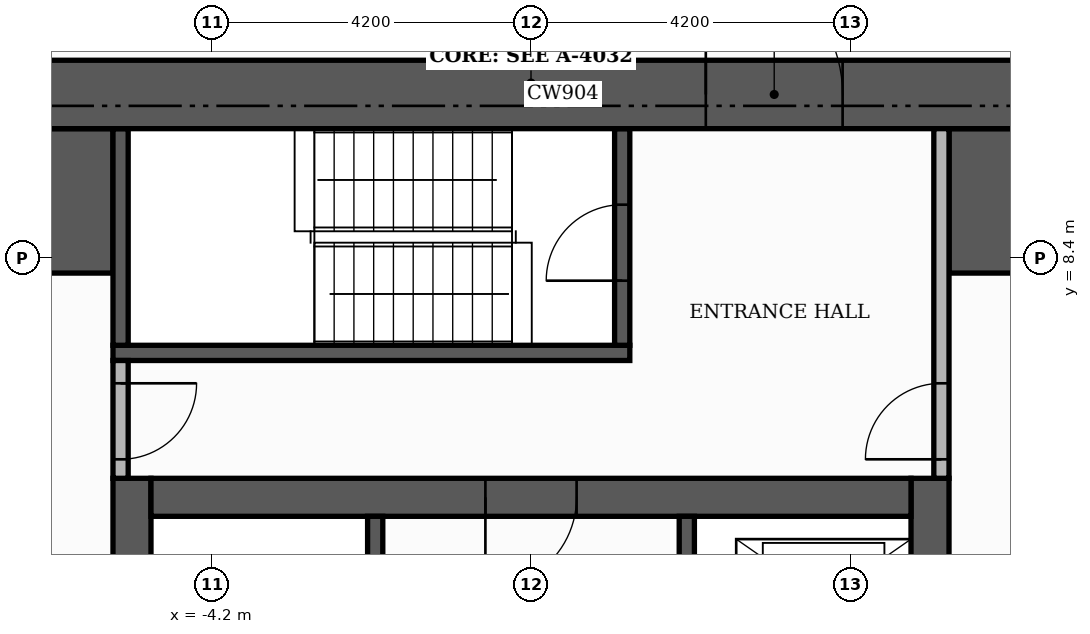
"""IFC4 building model, lengths in metres.
Left out: names, types, materials, properties, quantities, classifications, styles, units other than length and angle.
Written with IfcOpenShell. Run it as: python <this file> out.ifc"""

import sys

from ifc_helpers import new_model, si_unit, direction, frame, frame_2d, origin, place, context, subcontext, project, spatial, rectangle, extrude, element, fill, save


model = new_model("IFC4")
c1 = context("Model", 3, precision=1e-05, world=origin(), true_north=direction((0.0, 1.0)))
c2 = subcontext(c1, "Body", "Model", "MODEL_VIEW")
j1 = project(units=[si_unit("LENGTHUNIT", "METRE"), si_unit("PLANEANGLEUNIT", "RADIAN")], contexts=[c1])
p1 = place(None, origin())
s1 = spatial("IfcSite", under=j1, at=p1, CompositionType="ELEMENT")
p2 = place(p1, origin())
s2 = spatial("IfcBuilding", under=s1, at=p2, CompositionType="ELEMENT")
p3 = place(p2, frame((0.0, 0.0, 192.3)))
s3 = spatial("IfcBuildingStorey", under=s2, at=p3, CompositionType="ELEMENT", Elevation=192.3)
for number, where, z_axis, x_axis in (
    (1, (-5.25, -5.0, 0.0), (0.0, 0.0, 1.0), (0.0, 1.0, 0.0)),
    (2, (5.25, -5.0, 0.0), (0.0, 0.0, 1.0), (0.0, 1.0, 0.0)),
):
    element("IfcWall", number, at=place(p3, frame(where, z_axis=z_axis, x_axis=x_axis)), inside=s3, PredefinedType="SHEAR", context=c2, shape_type="SweptSolid", body=[
        extrude(rectangle(XDim=10.5, YDim=0.5, at=frame_2d((5.25, 0.0))), origin(), (0.0, 0.0, 1.0), 3.48),
    ])
p4 = place(p3, frame((-5.0, 5.25, 0.0), z_axis=(0.0, 0.0, 1.0), x_axis=(1.0, 0.0, 0.0)))
e3 = element("IfcWall", 3, at=p4, inside=s3, PredefinedType="SHEAR", context=c2, shape_type="SweptSolid", body=[
    extrude(rectangle(XDim=10.0, YDim=0.5, at=frame_2d((5.0, 0.0))), origin(), (0.0, 0.0, 1.0), 3.48),
])
p5 = place(p4, frame((4.4, 0.0, 0.0)))
e4 = element("IfcOpeningElement", 4, at=p5, cuts=e3, PredefinedType="OPENING", context=c2, shape_type="SweptSolid", body=[
    extrude(rectangle(XDim=1.2, YDim=2.1, at=frame_2d((0.6, 1.05))), frame((0.0, 0.26, 0.0), z_axis=(0.0, -1.0, 0.0), x_axis=(1.0, 0.0, 0.0)), (0.0, 0.0, 1.0), 0.52),
])
for number, where, z_axis, x_axis in (
    (5, (-10.1, 9.15, 0.0), (0.0, 0.0, 1.0), (1.0, 0.0, 0.0)),
    (6, (5.5, 9.15, 0.0), (0.0, 0.0, 1.0), (1.0, 0.0, 0.0)),
):
    element("IfcWall", number, at=place(p3, frame(where, z_axis=z_axis, x_axis=x_axis)), inside=s3, PredefinedType="SHEAR", context=c2, shape_type="SweptSolid", body=[
        extrude(rectangle(XDim=4.6, YDim=1.9, at=frame_2d((2.3, 0.0))), origin(), (0.0, 0.0, 1.0), 3.48),
    ])
p6 = place(p3, frame((-2.05, -1.4, 0.0), z_axis=(0.0, 0.0, 1.0), x_axis=(0.0, 1.0, 0.0)))
e7 = element("IfcWall", 7, at=p6, inside=s3, PredefinedType="SHEAR", context=c2, shape_type="SweptSolid", body=[
    extrude(rectangle(XDim=6.4, YDim=0.2, at=frame_2d((3.2, 0.0))), origin(), (0.0, 0.0, 1.0), 3.48),
])
p7 = place(p6, frame((0.15, 0.0, 0.0)))
e8 = element("IfcOpeningElement", 8, at=p7, cuts=e7, PredefinedType="OPENING", context=c2, shape_type="SweptSolid", body=[
    extrude(rectangle(XDim=1.0, YDim=2.1, at=frame_2d((0.5, 1.05))), frame((0.0, 0.11, 0.0), z_axis=(0.0, -1.0, 0.0), x_axis=(1.0, 0.0, 0.0)), (0.0, 0.0, 1.0), 0.22),
])
p8 = place(p3, frame((-5.5, 7.15, 0.0), z_axis=(0.0, 0.0, 1.0), x_axis=(1.0, 0.0, 0.0)))
e9 = element("IfcWall", 9, at=p8, inside=s3, PredefinedType="SHEAR", context=c2, shape_type="SweptSolid", body=[
    extrude(rectangle(XDim=6.8, YDim=0.2, at=frame_2d((3.4, 0.0))), origin(), (0.0, 0.0, 1.0), 3.48),
])
p9 = place(p3, frame((-5.4, 7.25, 0.0), z_axis=(0.0, 0.0, 1.0), x_axis=(0.0, 1.0, 0.0)))
e10 = element("IfcWall", 10, at=p9, inside=s3, PredefinedType="SHEAR", context=c2, shape_type="SweptSolid", body=[
    extrude(rectangle(XDim=2.85, YDim=0.2, at=frame_2d((1.425, 0.0))), origin(), (0.0, 0.0, 1.0), 3.48),
])
p10 = place(p3, frame((1.2, 7.25, 0.0), z_axis=(0.0, 0.0, 1.0), x_axis=(0.0, 1.0, 0.0)))
e11 = element("IfcWall", 11, at=p10, inside=s3, PredefinedType="SHEAR", context=c2, shape_type="SweptSolid", body=[
    extrude(rectangle(XDim=2.85, YDim=0.2, at=frame_2d((1.425, 0.0))), origin(), (0.0, 0.0, 1.0), 3.48),
])
p11 = place(p10, frame((0.85, 0.0, 0.0)))
e12 = element("IfcOpeningElement", 12, at=p11, cuts=e11, PredefinedType="OPENING", context=c2, shape_type="SweptSolid", body=[
    extrude(rectangle(XDim=1.0, YDim=2.1, at=frame_2d((0.5, 1.05))), frame((0.0, 0.11, 0.0), z_axis=(0.0, -1.0, 0.0), x_axis=(1.0, 0.0, 0.0)), (0.0, 0.0, 1.0), 0.22),
])
p12 = place(p3, frame((2.05, 1.6, 0.0), z_axis=(0.0, 0.0, 1.0), x_axis=(0.0, 1.0, 0.0)))
e13 = element("IfcWall", 13, at=p12, inside=s3, PredefinedType="SHEAR", context=c2, shape_type="SweptSolid", body=[
    extrude(rectangle(XDim=3.4, YDim=0.2, at=frame_2d((1.7, 0.0))), origin(), (0.0, 0.0, 1.0), 3.48),
])
p13 = place(p12, frame((1.75, 0.0, 0.0)))
e14 = element("IfcOpeningElement", 14, at=p13, cuts=e13, PredefinedType="OPENING", context=c2, shape_type="SweptSolid", body=[
    extrude(rectangle(XDim=1.1, YDim=2.1, at=frame_2d((0.55, 1.05))), frame((0.0, 0.11, 0.0), z_axis=(0.0, -1.0, 0.0), x_axis=(1.0, 0.0, 0.0)), (0.0, 0.0, 1.0), 0.22),
])
p14 = place(p12, frame((0.15, 0.0, 0.0)))
e15 = element("IfcOpeningElement", 15, at=p14, cuts=e13, PredefinedType="OPENING", context=c2, shape_type="SweptSolid", body=[
    extrude(rectangle(XDim=0.8, YDim=2.1, at=frame_2d((0.4, 1.05))), frame((0.0, 0.11, 0.0), z_axis=(0.0, -1.0, 0.0), x_axis=(1.0, 0.0, 0.0)), (0.0, 0.0, 1.0), 0.22),
])
p15 = place(p3, frame((-11.0, 10.55, 0.0), z_axis=(0.0, 0.0, 1.0), x_axis=(1.0, 0.0, 0.0)))
e16 = element("IfcWall", 16, at=p15, inside=s3, PredefinedType="SHEAR", context=c2, shape_type="SweptSolid", body=[
    extrude(rectangle(XDim=22.0, YDim=0.9, at=frame_2d((11.0, 0.0))), origin(), (0.0, 0.0, 1.0), 3.48),
])
p16 = place(p15, frame((13.3, 0.0, 0.0)))
e17 = element("IfcOpeningElement", 17, at=p16, cuts=e16, PredefinedType="OPENING", context=c2, shape_type="SweptSolid", body=[
    extrude(rectangle(XDim=1.8, YDim=2.2, at=frame_2d((0.9, 1.1))), frame((0.0, 0.46, 0.0), z_axis=(0.0, -1.0, 0.0), x_axis=(1.0, 0.0, 0.0)), (0.0, 0.0, 1.0), 0.92),
])
p17 = place(p3, frame((-5.4, 5.5, 0.0), z_axis=(0.0, 0.0, 1.0), x_axis=(0.0, 1.0, 0.0)))
e18 = element("IfcWall", 18, at=p17, inside=s3, PredefinedType="PARTITIONING", context=c2, shape_type="SweptSolid", body=[
    extrude(rectangle(XDim=1.55, YDim=0.2, at=frame_2d((0.775, 0.0))), origin(), (0.0, 0.0, 1.0), 3.48),
])
p18 = place(p17, frame((0.25, 0.0, 0.0)))
e19 = element("IfcOpeningElement", 19, at=p18, cuts=e18, PredefinedType="OPENING", context=c2, shape_type="SweptSolid", body=[
    extrude(rectangle(XDim=1.0, YDim=2.1, at=frame_2d((0.5, 1.05))), frame((0.0, 0.11, 0.0), z_axis=(0.0, -1.0, 0.0), x_axis=(1.0, 0.0, 0.0)), (0.0, 0.0, 1.0), 0.22),
])
p19 = place(p3, frame((5.4, 5.5, 0.0), z_axis=(0.0, 0.0, 1.0), x_axis=(0.0, 1.0, 0.0)))
e20 = element("IfcWall", 20, at=p19, inside=s3, PredefinedType="PARTITIONING", context=c2, shape_type="SweptSolid", body=[
    extrude(rectangle(XDim=4.6, YDim=0.2, at=frame_2d((2.3, 0.0))), origin(), (0.0, 0.0, 1.0), 3.48),
])
p20 = place(p19, frame((0.25, 0.0, 0.0)))
e21 = element("IfcOpeningElement", 21, at=p20, cuts=e20, PredefinedType="OPENING", context=c2, shape_type="SweptSolid", body=[
    extrude(rectangle(XDim=1.0, YDim=2.1, at=frame_2d((0.5, 1.05))), frame((0.0, 0.11, 0.0), z_axis=(0.0, -1.0, 0.0), x_axis=(1.0, 0.0, 0.0)), (0.0, 0.0, 1.0), 0.22),
])
p21 = place(p5, frame((1.2, 0.0, 0.0), z_axis=(0.0, 0.0, 1.0), x_axis=(-1.0, 0.0, 0.0)))
e22 = element("IfcDoor", 22, at=p21, inside=s3, OperationType="SINGLE_SWING_LEFT", PredefinedType="DOOR", context=c2, shape_type="SweptSolid", body=[
    extrude(rectangle(XDim=1.2, YDim=2.1, at=frame_2d((0.6, 1.05))), frame((0.0, 0.025, 0.0), z_axis=(0.0, -1.0, 0.0), x_axis=(1.0, 0.0, 0.0)), (0.0, 0.0, 1.0), 0.05),
])
fill(e4, e22)
p22 = place(p11, origin())
e23 = element("IfcDoor", 23, at=p22, inside=s3, OperationType="SINGLE_SWING_LEFT", PredefinedType="DOOR", context=c2, shape_type="SweptSolid", body=[
    extrude(rectangle(XDim=1.0, YDim=2.1, at=frame_2d((0.5, 1.05))), frame((0.0, 0.025, 0.0), z_axis=(0.0, -1.0, 0.0), x_axis=(1.0, 0.0, 0.0)), (0.0, 0.0, 1.0), 0.05),
])
fill(e12, e23)
p23 = place(p18, frame((1.0, 0.0, 0.0), z_axis=(0.0, 0.0, 1.0), x_axis=(-1.0, 0.0, 0.0)))
e24 = element("IfcDoor", 24, at=p23, inside=s3, OperationType="SINGLE_SWING_RIGHT", PredefinedType="DOOR", context=c2, shape_type="SweptSolid", body=[
    extrude(rectangle(XDim=1.0, YDim=2.1, at=frame_2d((0.5, 1.05))), frame((0.0, 0.025, 0.0), z_axis=(0.0, -1.0, 0.0), x_axis=(1.0, 0.0, 0.0)), (0.0, 0.0, 1.0), 0.05),
])
fill(e19, e24)
p24 = place(p20, origin())
e25 = element("IfcDoor", 25, at=p24, inside=s3, OperationType="SINGLE_SWING_LEFT", PredefinedType="DOOR", context=c2, shape_type="SweptSolid", body=[
    extrude(rectangle(XDim=1.0, YDim=2.1, at=frame_2d((0.5, 1.05))), frame((0.0, 0.025, 0.0), z_axis=(0.0, -1.0, 0.0), x_axis=(1.0, 0.0, 0.0)), (0.0, 0.0, 1.0), 0.05),
])
fill(e21, e25)
p25 = place(p16, origin())
e26 = element("IfcDoor", 26, at=p25, inside=s3, OperationType="DOUBLE_DOOR_SINGLE_SWING", PredefinedType="DOOR", context=c2, shape_type="SweptSolid", body=[
    extrude(rectangle(XDim=1.8, YDim=2.2, at=frame_2d((0.9, 1.1))), frame((0.0, 0.025, 0.0), z_axis=(0.0, -1.0, 0.0), x_axis=(1.0, 0.0, 0.0)), (0.0, 0.0, 1.0), 0.05),
])
fill(e17, e26)
save(model, sys.argv[1])
